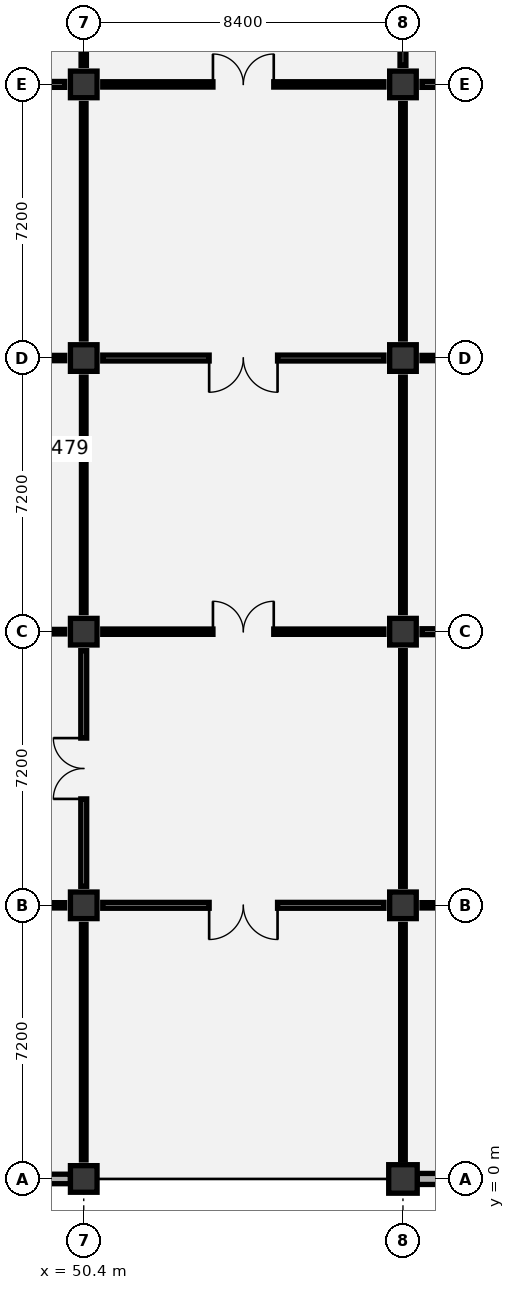
"""IFC4 building model, lengths in metres.
Left out: names, types, materials, properties, quantities, classifications, styles, units other than length and angle.
Written with IfcOpenShell. Run it as: python <this file> out.ifc"""

import sys

from ifc_helpers import new_model, si_unit, direction, frame, frame_2d, origin, origin_2d, place, context, subcontext, project, spatial, rectangle, circle, extrude, element, fill, save


model = new_model("IFC4")
c1 = context("Model", 3, precision=1e-05, world=origin(), true_north=direction((0.0, 1.0)))
c2 = subcontext(c1, "Body", "Model", "MODEL_VIEW")
j1 = project(units=[si_unit("LENGTHUNIT", "METRE"), si_unit("PLANEANGLEUNIT", "RADIAN")], contexts=[c1])
p1 = place(None, origin())
s1 = spatial("IfcSite", under=j1, at=p1, CompositionType="ELEMENT")
p2 = place(p1, origin())
s2 = spatial("IfcBuilding", under=s1, at=p2, CompositionType="ELEMENT")
p3 = place(p2, frame((0.0, 0.0, 6.0)))
s3 = spatial("IfcBuildingStorey", under=s2, at=p3, CompositionType="ELEMENT", Elevation=6.0)
for number, where, z_axis, x_axis in (
    (1, (50.4, 0.0, 0.0), (0.0, 0.0, 1.0), (1.0, 0.0, 0.0)),
    (2, (50.4, 7.2, 0.0), (0.0, 0.0, 1.0), (1.0, 0.0, 0.0)),
    (3, (50.4, 14.4, 0.0), (0.0, 0.0, 1.0), (1.0, 0.0, 0.0)),
    (4, (50.4, 21.6, 0.0), (0.0, 0.0, 1.0), (1.0, 0.0, 0.0)),
    (5, (50.4, 28.8, 0.0), (0.0, 0.0, 1.0), (1.0, 0.0, 0.0)),
):
    element("IfcColumn", number, at=place(p3, frame(where, z_axis=z_axis, x_axis=x_axis)), inside=s3, PredefinedType="COLUMN", context=c2, shape_type="SweptSolid", body=[
        extrude(rectangle(XDim=0.7, YDim=0.7, at=origin_2d()), origin(), (0.0, 0.0, 1.0), 5.4),
    ])
p4 = place(p3, frame((58.8, 0.0, 0.0), z_axis=(0.0, 0.0, 1.0), x_axis=(1.0, 0.0, 0.0)))
e6 = element("IfcColumn", 6, at=p4, inside=s3, PredefinedType="COLUMN", context=c2, shape_type="SweptSolid", body=[
    extrude(circle(Radius=0.375, at=origin_2d()), origin(), (0.0, 0.0, 1.0), 5.4),
])
for number, where, z_axis, x_axis in (
    (7, (58.8, 7.2, 0.0), (0.0, 0.0, 1.0), (1.0, 0.0, 0.0)),
    (8, (58.8, 14.4, 0.0), (0.0, 0.0, 1.0), (1.0, 0.0, 0.0)),
    (9, (58.8, 21.6, 0.0), (0.0, 0.0, 1.0), (1.0, 0.0, 0.0)),
    (10, (58.8, 28.8, 0.0), (0.0, 0.0, 1.0), (1.0, 0.0, 0.0)),
):
    element("IfcColumn", number, at=place(p3, frame(where, z_axis=z_axis, x_axis=x_axis)), inside=s3, PredefinedType="COLUMN", context=c2, shape_type="SweptSolid", body=[
        extrude(rectangle(XDim=0.7, YDim=0.7, at=origin_2d()), origin(), (0.0, 0.0, 1.0), 5.4),
    ])
p5 = place(p3, frame((42.35, 0.0, 0.0), z_axis=(0.0, 0.0, 1.0), x_axis=(1.0, 0.0, 0.0)))
e11 = element("IfcWall", 11, at=p5, inside=s3, PredefinedType="SOLIDWALL", context=c2, shape_type="SweptSolid", body=[
    extrude(rectangle(XDim=7.7, YDim=0.25, at=frame_2d((3.85, 0.0))), origin(), (0.0, 0.0, 1.0), 4.42),
])
p6 = place(p5, frame((0.967, 0.0, 0.9)))
e12 = element("IfcOpeningElement", 12, at=p6, cuts=e11, PredefinedType="OPENING", context=c2, shape_type="SweptSolid", body=[
    extrude(rectangle(XDim=2.4, YDim=2.1, at=frame_2d((1.2, 1.05))), frame((0.0, 0.135, 0.0), z_axis=(0.0, -1.0, 0.0), x_axis=(1.0, 0.0, 0.0)), (0.0, 0.0, 1.0), 0.27),
])
p7 = place(p5, frame((4.333, 0.0, 0.9)))
e13 = element("IfcOpeningElement", 13, at=p7, cuts=e11, PredefinedType="OPENING", context=c2, shape_type="SweptSolid", body=[
    extrude(rectangle(XDim=2.4, YDim=2.1, at=frame_2d((1.2, 1.05))), frame((0.0, 0.135, 0.0), z_axis=(0.0, -1.0, 0.0), x_axis=(1.0, 0.0, 0.0)), (0.0, 0.0, 1.0), 0.27),
])
p8 = place(p3, frame((59.175, 0.0, 0.0), z_axis=(0.0, 0.0, 1.0), x_axis=(1.0, 0.0, 0.0)))
e14 = element("IfcWall", 14, at=p8, inside=s3, PredefinedType="SOLIDWALL", context=c2, shape_type="SweptSolid", body=[
    extrude(rectangle(XDim=7.675, YDim=0.29, at=frame_2d((3.837, 0.0))), origin(), (0.0, 0.0, 1.0), 4.42),
])
p9 = place(p8, frame((2.337, 0.0, 0.9)))
e15 = element("IfcOpeningElement", 15, at=p9, cuts=e14, PredefinedType="OPENING", context=c2, shape_type="SweptSolid", body=[
    extrude(rectangle(XDim=3.0, YDim=2.1, at=frame_2d((1.5, 1.05))), frame((0.0, 0.155, 0.0), z_axis=(0.0, -1.0, 0.0), x_axis=(1.0, 0.0, 0.0)), (0.0, 0.0, 1.0), 0.31),
])
p10 = place(p3, frame((42.15, 19.2, 0.0), z_axis=(0.0, 0.0, 1.0), x_axis=(1.0, 0.0, 0.0)))
e16 = element("IfcWall", 16, at=p10, inside=s3, PredefinedType="PARTITIONING", context=c2, shape_type="SweptSolid", body=[
    extrude(rectangle(XDim=8.1, YDim=0.12, at=frame_2d((4.05, 0.0))), origin(), (0.0, 0.0, 1.0), 5.075),
])
p11 = place(p10, frame((1.08, 0.0, 0.0)))
e17 = element("IfcOpeningElement", 17, at=p11, cuts=e16, PredefinedType="OPENING", context=c2, shape_type="SweptSolid", body=[
    extrude(rectangle(XDim=0.95, YDim=2.1, at=frame_2d((0.475, 1.05))), frame((0.0, 0.07, 0.0), z_axis=(0.0, -1.0, 0.0), x_axis=(1.0, 0.0, 0.0)), (0.0, 0.0, 1.0), 0.14),
])
p12 = place(p10, frame((3.63, 0.0, 0.0)))
e18 = element("IfcOpeningElement", 18, at=p12, cuts=e16, PredefinedType="OPENING", context=c2, shape_type="SweptSolid", body=[
    extrude(rectangle(XDim=0.9, YDim=2.1, at=frame_2d((0.45, 1.05))), frame((0.0, 0.07, 0.0), z_axis=(0.0, -1.0, 0.0), x_axis=(1.0, 0.0, 0.0)), (0.0, 0.0, 1.0), 0.14),
])
p13 = place(p10, frame((6.13, 0.0, 0.0)))
e19 = element("IfcOpeningElement", 19, at=p13, cuts=e16, PredefinedType="OPENING", context=c2, shape_type="SweptSolid", body=[
    extrude(rectangle(XDim=1.0, YDim=2.1, at=frame_2d((0.5, 1.05))), frame((0.0, 0.07, 0.0), z_axis=(0.0, -1.0, 0.0), x_axis=(1.0, 0.0, 0.0)), (0.0, 0.0, 1.0), 0.14),
])
p14 = place(p3, frame((50.4, 0.5, 0.0), z_axis=(0.0, 0.0, 1.0), x_axis=(0.0, 1.0, 0.0)))
e20 = element("IfcWall", 20, at=p14, inside=s3, PredefinedType="PARTITIONING", context=c2, shape_type="SweptSolid", body=[
    extrude(rectangle(XDim=6.2, YDim=0.12, at=frame_2d((3.1, 0.0))), origin(), (0.0, 0.0, 1.0), 4.32),
])
p15 = place(p3, frame((42.5, 7.2, 0.0), z_axis=(0.0, 0.0, 1.0), x_axis=(1.0, 0.0, 0.0)))
e21 = element("IfcWall", 21, at=p15, inside=s3, PredefinedType="PARTITIONING", context=c2, shape_type="SweptSolid", body=[
    extrude(rectangle(XDim=7.4, YDim=0.14, at=frame_2d((3.7, 0.0))), origin(), (0.0, 0.0, 1.0), 4.27),
])
p16 = place(p15, frame((2.8, 0.0, 0.0)))
e22 = element("IfcOpeningElement", 22, at=p16, cuts=e21, PredefinedType="OPENING", context=c2, shape_type="SweptSolid", body=[
    extrude(rectangle(XDim=1.8, YDim=2.25, at=frame_2d((0.9, 1.125))), frame((0.0, 0.08, 0.0), z_axis=(0.0, -1.0, 0.0), x_axis=(1.0, 0.0, 0.0)), (0.0, 0.0, 1.0), 0.16),
])
p17 = place(p3, frame((50.4, 7.7, 0.0), z_axis=(0.0, 0.0, 1.0), x_axis=(0.0, 1.0, 0.0)))
e23 = element("IfcWall", 23, at=p17, inside=s3, PredefinedType="PARTITIONING", context=c2, shape_type="SweptSolid", body=[
    extrude(rectangle(XDim=6.2, YDim=0.155, at=frame_2d((3.1, 0.0))), origin(), (0.0, 0.0, 1.0), 4.78),
])
p18 = place(p17, frame((2.3, 0.0, 0.0)))
e24 = element("IfcOpeningElement", 24, at=p18, cuts=e23, PredefinedType="OPENING", context=c2, shape_type="SweptSolid", body=[
    extrude(rectangle(XDim=1.6, YDim=2.2, at=frame_2d((0.8, 1.1))), frame((0.0, 0.087, 0.0), z_axis=(0.0, -1.0, 0.0), x_axis=(1.0, 0.0, 0.0)), (0.0, 0.0, 1.0), 0.175),
])
p19 = place(p3, frame((42.5, 14.4, 0.0), z_axis=(0.0, 0.0, 1.0), x_axis=(1.0, 0.0, 0.0)))
e25 = element("IfcWall", 25, at=p19, inside=s3, PredefinedType="PARTITIONING", context=c2, shape_type="SweptSolid", body=[
    extrude(rectangle(XDim=7.4, YDim=0.12, at=frame_2d((3.7, 0.0))), origin(), (0.0, 0.0, 1.0), 4.27),
])
p20 = place(p3, frame((50.4, 14.9, 0.0), z_axis=(0.0, 0.0, 1.0), x_axis=(0.0, 1.0, 0.0)))
e26 = element("IfcWall", 26, at=p20, inside=s3, PredefinedType="PARTITIONING", context=c2, shape_type="SweptSolid", body=[
    extrude(rectangle(XDim=6.2, YDim=0.12, at=frame_2d((3.1, 0.0))), origin(), (0.0, 0.0, 1.0), 4.32),
])
p21 = place(p3, frame((42.5, 21.6, 0.0), z_axis=(0.0, 0.0, 1.0), x_axis=(1.0, 0.0, 0.0)))
e27 = element("IfcWall", 27, at=p21, inside=s3, PredefinedType="PARTITIONING", context=c2, shape_type="SweptSolid", body=[
    extrude(rectangle(XDim=7.4, YDim=0.14, at=frame_2d((3.7, 0.0))), origin(), (0.0, 0.0, 1.0), 4.27),
])
p22 = place(p21, frame((2.8, 0.0, 0.0)))
e28 = element("IfcOpeningElement", 28, at=p22, cuts=e27, PredefinedType="OPENING", context=c2, shape_type="SweptSolid", body=[
    extrude(rectangle(XDim=1.8, YDim=2.25, at=frame_2d((0.9, 1.125))), frame((0.0, 0.08, 0.0), z_axis=(0.0, -1.0, 0.0), x_axis=(1.0, 0.0, 0.0)), (0.0, 0.0, 1.0), 0.16),
])
p23 = place(p3, frame((50.4, 22.1, 0.0), z_axis=(0.0, 0.0, 1.0), x_axis=(0.0, 1.0, 0.0)))
e29 = element("IfcWall", 29, at=p23, inside=s3, PredefinedType="PARTITIONING", context=c2, shape_type="SweptSolid", body=[
    extrude(rectangle(XDim=6.2, YDim=0.12, at=frame_2d((3.1, 0.0))), origin(), (0.0, 0.0, 1.0), 4.57),
])
p24 = place(p3, frame((42.5, 28.8, 0.0), z_axis=(0.0, 0.0, 1.0), x_axis=(1.0, 0.0, 0.0)))
e30 = element("IfcWall", 30, at=p24, inside=s3, PredefinedType="PARTITIONING", context=c2, shape_type="SweptSolid", body=[
    extrude(rectangle(XDim=7.4, YDim=0.155, at=frame_2d((3.7, 0.0))), origin(), (0.0, 0.0, 1.0), 4.27),
])
p25 = place(p24, frame((2.9, 0.0, 0.0)))
e31 = element("IfcOpeningElement", 31, at=p25, cuts=e30, PredefinedType="OPENING", context=c2, shape_type="SweptSolid", body=[
    extrude(rectangle(XDim=1.6, YDim=2.2, at=frame_2d((0.8, 1.1))), frame((0.0, 0.087, 0.0), z_axis=(0.0, -1.0, 0.0), x_axis=(1.0, 0.0, 0.0)), (0.0, 0.0, 1.0), 0.175),
])
p26 = place(p3, frame((50.4, 29.3, 0.0), z_axis=(0.0, 0.0, 1.0), x_axis=(0.0, 1.0, 0.0)))
e32 = element("IfcWall", 32, at=p26, inside=s3, PredefinedType="PARTITIONING", context=c2, shape_type="SweptSolid", body=[
    extrude(rectangle(XDim=6.2, YDim=0.14, at=frame_2d((3.1, 0.0))), origin(), (0.0, 0.0, 1.0), 4.32),
])
p27 = place(p26, frame((2.2, 0.0, 0.0)))
e33 = element("IfcOpeningElement", 33, at=p27, cuts=e32, PredefinedType="OPENING", context=c2, shape_type="SweptSolid", body=[
    extrude(rectangle(XDim=1.8, YDim=2.25, at=frame_2d((0.9, 1.125))), frame((0.0, 0.08, 0.0), z_axis=(0.0, -1.0, 0.0), x_axis=(1.0, 0.0, 0.0)), (0.0, 0.0, 1.0), 0.16),
])
p28 = place(p3, frame((58.8, 0.5, 0.0), z_axis=(0.0, 0.0, 1.0), x_axis=(0.0, 1.0, 0.0)))
e34 = element("IfcWall", 34, at=p28, inside=s3, PredefinedType="PARTITIONING", context=c2, shape_type="SweptSolid", body=[
    extrude(rectangle(XDim=6.2, YDim=0.12, at=frame_2d((3.1, 0.0))), origin(), (0.0, 0.0, 1.0), 4.78),
])
p29 = place(p3, frame((50.9, 7.2, 0.0), z_axis=(0.0, 0.0, 1.0), x_axis=(1.0, 0.0, 0.0)))
e35 = element("IfcWall", 35, at=p29, inside=s3, PredefinedType="PARTITIONING", context=c2, shape_type="SweptSolid", body=[
    extrude(rectangle(XDim=7.4, YDim=0.155, at=frame_2d((3.7, 0.0))), origin(), (0.0, 0.0, 1.0), 4.27),
])
p30 = place(p29, frame((2.8, 0.0, 0.0)))
e36 = element("IfcOpeningElement", 36, at=p30, cuts=e35, PredefinedType="OPENING", context=c2, shape_type="SweptSolid", body=[
    extrude(rectangle(XDim=1.8, YDim=2.25, at=frame_2d((0.9, 1.125))), frame((0.0, 0.087, 0.0), z_axis=(0.0, -1.0, 0.0), x_axis=(1.0, 0.0, 0.0)), (0.0, 0.0, 1.0), 0.175),
])
p31 = place(p3, frame((58.8, 7.7, 0.0), z_axis=(0.0, 0.0, 1.0), x_axis=(0.0, 1.0, 0.0)))
e37 = element("IfcWall", 37, at=p31, inside=s3, PredefinedType="PARTITIONING", context=c2, shape_type="SweptSolid", body=[
    extrude(rectangle(XDim=6.2, YDim=0.12, at=frame_2d((3.1, 0.0))), origin(), (0.0, 0.0, 1.0), 4.32),
])
p32 = place(p3, frame((50.9, 14.4, 0.0), z_axis=(0.0, 0.0, 1.0), x_axis=(1.0, 0.0, 0.0)))
e38 = element("IfcWall", 38, at=p32, inside=s3, PredefinedType="PARTITIONING", context=c2, shape_type="SweptSolid", body=[
    extrude(rectangle(XDim=7.4, YDim=0.14, at=frame_2d((3.7, 0.0))), origin(), (0.0, 0.0, 1.0), 4.27),
])
p33 = place(p32, frame((2.9, 0.0, 0.0)))
e39 = element("IfcOpeningElement", 39, at=p33, cuts=e38, PredefinedType="OPENING", context=c2, shape_type="SweptSolid", body=[
    extrude(rectangle(XDim=1.6, YDim=2.2, at=frame_2d((0.8, 1.1))), frame((0.0, 0.08, 0.0), z_axis=(0.0, -1.0, 0.0), x_axis=(1.0, 0.0, 0.0)), (0.0, 0.0, 1.0), 0.16),
])
p34 = place(p3, frame((58.8, 14.9, 0.0), z_axis=(0.0, 0.0, 1.0), x_axis=(0.0, 1.0, 0.0)))
e40 = element("IfcWall", 40, at=p34, inside=s3, PredefinedType="PARTITIONING", context=c2, shape_type="SweptSolid", body=[
    extrude(rectangle(XDim=6.2, YDim=0.12, at=frame_2d((3.1, 0.0))), origin(), (0.0, 0.0, 1.0), 4.57),
])
p35 = place(p3, frame((50.9, 21.6, 0.0), z_axis=(0.0, 0.0, 1.0), x_axis=(1.0, 0.0, 0.0)))
e41 = element("IfcWall", 41, at=p35, inside=s3, PredefinedType="PARTITIONING", context=c2, shape_type="SweptSolid", body=[
    extrude(rectangle(XDim=7.4, YDim=0.155, at=frame_2d((3.7, 0.0))), origin(), (0.0, 0.0, 1.0), 4.27),
])
p36 = place(p35, frame((2.8, 0.0, 0.0)))
e42 = element("IfcOpeningElement", 42, at=p36, cuts=e41, PredefinedType="OPENING", context=c2, shape_type="SweptSolid", body=[
    extrude(rectangle(XDim=1.8, YDim=2.25, at=frame_2d((0.9, 1.125))), frame((0.0, 0.087, 0.0), z_axis=(0.0, -1.0, 0.0), x_axis=(1.0, 0.0, 0.0)), (0.0, 0.0, 1.0), 0.175),
])
p37 = place(p3, frame((58.8, 22.1, 0.0), z_axis=(0.0, 0.0, 1.0), x_axis=(0.0, 1.0, 0.0)))
e43 = element("IfcWall", 43, at=p37, inside=s3, PredefinedType="PARTITIONING", context=c2, shape_type="SweptSolid", body=[
    extrude(rectangle(XDim=6.2, YDim=0.12, at=frame_2d((3.1, 0.0))), origin(), (0.0, 0.0, 1.0), 4.32),
])
p38 = place(p3, frame((50.9, 28.8, 0.0), z_axis=(0.0, 0.0, 1.0), x_axis=(1.0, 0.0, 0.0)))
e44 = element("IfcWall", 44, at=p38, inside=s3, PredefinedType="PARTITIONING", context=c2, shape_type="SweptSolid", body=[
    extrude(rectangle(XDim=7.4, YDim=0.14, at=frame_2d((3.7, 0.0))), origin(), (0.0, 0.0, 1.0), 4.27),
])
p39 = place(p38, frame((2.9, 0.0, 0.0)))
e45 = element("IfcOpeningElement", 45, at=p39, cuts=e44, PredefinedType="OPENING", context=c2, shape_type="SweptSolid", body=[
    extrude(rectangle(XDim=1.6, YDim=2.2, at=frame_2d((0.8, 1.1))), frame((0.0, 0.08, 0.0), z_axis=(0.0, -1.0, 0.0), x_axis=(1.0, 0.0, 0.0)), (0.0, 0.0, 1.0), 0.16),
])
p40 = place(p3, frame((58.8, 29.3, 0.0), z_axis=(0.0, 0.0, 1.0), x_axis=(0.0, 1.0, 0.0)))
e46 = element("IfcWall", 46, at=p40, inside=s3, PredefinedType="PARTITIONING", context=c2, shape_type="SweptSolid", body=[
    extrude(rectangle(XDim=6.2, YDim=0.155, at=frame_2d((3.1, 0.0))), origin(), (0.0, 0.0, 1.0), 4.67),
])
p41 = place(p40, frame((2.2, 0.0, 0.0)))
e47 = element("IfcOpeningElement", 47, at=p41, cuts=e46, PredefinedType="OPENING", context=c2, shape_type="SweptSolid", body=[
    extrude(rectangle(XDim=1.8, YDim=2.25, at=frame_2d((0.9, 1.125))), frame((0.0, 0.087, 0.0), z_axis=(0.0, -1.0, 0.0), x_axis=(1.0, 0.0, 0.0)), (0.0, 0.0, 1.0), 0.175),
])
p42 = place(p3, frame((59.3, 7.2, 0.0), z_axis=(0.0, 0.0, 1.0), x_axis=(1.0, 0.0, 0.0)))
e48 = element("IfcWall", 48, at=p42, inside=s3, PredefinedType="PARTITIONING", context=c2, shape_type="SweptSolid", body=[
    extrude(rectangle(XDim=7.4, YDim=0.14, at=frame_2d((3.7, 0.0))), origin(), (0.0, 0.0, 1.0), 4.27),
])
p43 = place(p42, frame((2.8, 0.0, 0.0)))
e49 = element("IfcOpeningElement", 49, at=p43, cuts=e48, PredefinedType="OPENING", context=c2, shape_type="SweptSolid", body=[
    extrude(rectangle(XDim=1.8, YDim=2.25, at=frame_2d((0.9, 1.125))), frame((0.0, 0.08, 0.0), z_axis=(0.0, -1.0, 0.0), x_axis=(1.0, 0.0, 0.0)), (0.0, 0.0, 1.0), 0.16),
])
p44 = place(p3, frame((59.3, 14.4, 0.0), z_axis=(0.0, 0.0, 1.0), x_axis=(1.0, 0.0, 0.0)))
e50 = element("IfcWall", 50, at=p44, inside=s3, PredefinedType="PARTITIONING", context=c2, shape_type="SweptSolid", body=[
    extrude(rectangle(XDim=7.4, YDim=0.155, at=frame_2d((3.7, 0.0))), origin(), (0.0, 0.0, 1.0), 4.27),
])
p45 = place(p44, frame((2.9, 0.0, 0.0)))
e51 = element("IfcOpeningElement", 51, at=p45, cuts=e50, PredefinedType="OPENING", context=c2, shape_type="SweptSolid", body=[
    extrude(rectangle(XDim=1.6, YDim=2.2, at=frame_2d((0.8, 1.1))), frame((0.0, 0.087, 0.0), z_axis=(0.0, -1.0, 0.0), x_axis=(1.0, 0.0, 0.0)), (0.0, 0.0, 1.0), 0.175),
])
p46 = place(p3, frame((59.3, 21.6, 0.0), z_axis=(0.0, 0.0, 1.0), x_axis=(1.0, 0.0, 0.0)))
e52 = element("IfcWall", 52, at=p46, inside=s3, PredefinedType="PARTITIONING", context=c2, shape_type="SweptSolid", body=[
    extrude(rectangle(XDim=7.4, YDim=0.14, at=frame_2d((3.7, 0.0))), origin(), (0.0, 0.0, 1.0), 4.27),
])
p47 = place(p46, frame((2.8, 0.0, 0.0)))
e53 = element("IfcOpeningElement", 53, at=p47, cuts=e52, PredefinedType="OPENING", context=c2, shape_type="SweptSolid", body=[
    extrude(rectangle(XDim=1.8, YDim=2.25, at=frame_2d((0.9, 1.125))), frame((0.0, 0.08, 0.0), z_axis=(0.0, -1.0, 0.0), x_axis=(1.0, 0.0, 0.0)), (0.0, 0.0, 1.0), 0.16),
])
p48 = place(p3, frame((59.3, 28.8, 0.0), z_axis=(0.0, 0.0, 1.0), x_axis=(1.0, 0.0, 0.0)))
e54 = element("IfcWall", 54, at=p48, inside=s3, PredefinedType="PARTITIONING", context=c2, shape_type="SweptSolid", body=[
    extrude(rectangle(XDim=7.4, YDim=0.155, at=frame_2d((3.7, 0.0))), origin(), (0.0, 0.0, 1.0), 4.27),
])
p49 = place(p48, frame((2.9, 0.0, 0.0)))
e55 = element("IfcOpeningElement", 55, at=p49, cuts=e54, PredefinedType="OPENING", context=c2, shape_type="SweptSolid", body=[
    extrude(rectangle(XDim=1.6, YDim=2.2, at=frame_2d((0.8, 1.1))), frame((0.0, 0.087, 0.0), z_axis=(0.0, -1.0, 0.0), x_axis=(1.0, 0.0, 0.0)), (0.0, 0.0, 1.0), 0.175),
])
p50 = place(p18, origin())
e56 = element("IfcDoor", 56, at=p50, inside=s3, OperationType="DOUBLE_DOOR_SINGLE_SWING", PredefinedType="DOOR", context=c2, shape_type="SweptSolid", body=[
    extrude(rectangle(XDim=1.6, YDim=2.2, at=frame_2d((0.8, 1.1))), frame((0.0, 0.025, 0.0), z_axis=(0.0, -1.0, 0.0), x_axis=(1.0, 0.0, 0.0)), (0.0, 0.0, 1.0), 0.05),
])
fill(e24, e56)
p51 = place(p30, frame((1.8, 0.0, 0.0), z_axis=(0.0, 0.0, 1.0), x_axis=(-1.0, 0.0, 0.0)))
e57 = element("IfcDoor", 57, at=p51, inside=s3, OperationType="DOUBLE_DOOR_SINGLE_SWING", PredefinedType="DOOR", context=c2, shape_type="SweptSolid", body=[
    extrude(rectangle(XDim=1.8, YDim=2.25, at=frame_2d((0.9, 1.125))), frame((0.0, 0.025, 0.0), z_axis=(0.0, -1.0, 0.0), x_axis=(1.0, 0.0, 0.0)), (0.0, 0.0, 1.0), 0.05),
])
fill(e36, e57)
p52 = place(p33, origin())
e58 = element("IfcDoor", 58, at=p52, inside=s3, OperationType="DOUBLE_DOOR_SINGLE_SWING", PredefinedType="DOOR", context=c2, shape_type="SweptSolid", body=[
    extrude(rectangle(XDim=1.6, YDim=2.2, at=frame_2d((0.8, 1.1))), frame((0.0, 0.025, 0.0), z_axis=(0.0, -1.0, 0.0), x_axis=(1.0, 0.0, 0.0)), (0.0, 0.0, 1.0), 0.05),
])
fill(e39, e58)
p53 = place(p36, frame((1.8, 0.0, 0.0), z_axis=(0.0, 0.0, 1.0), x_axis=(-1.0, 0.0, 0.0)))
e59 = element("IfcDoor", 59, at=p53, inside=s3, OperationType="DOUBLE_DOOR_SINGLE_SWING", PredefinedType="DOOR", context=c2, shape_type="SweptSolid", body=[
    extrude(rectangle(XDim=1.8, YDim=2.25, at=frame_2d((0.9, 1.125))), frame((0.0, 0.025, 0.0), z_axis=(0.0, -1.0, 0.0), x_axis=(1.0, 0.0, 0.0)), (0.0, 0.0, 1.0), 0.05),
])
fill(e42, e59)
p54 = place(p39, origin())
e60 = element("IfcDoor", 60, at=p54, inside=s3, OperationType="DOUBLE_DOOR_SINGLE_SWING", PredefinedType="DOOR", context=c2, shape_type="SweptSolid", body=[
    extrude(rectangle(XDim=1.6, YDim=2.2, at=frame_2d((0.8, 1.1))), frame((0.0, 0.025, 0.0), z_axis=(0.0, -1.0, 0.0), x_axis=(1.0, 0.0, 0.0)), (0.0, 0.0, 1.0), 0.05),
])
fill(e45, e60)
save(model, sys.argv[1])
